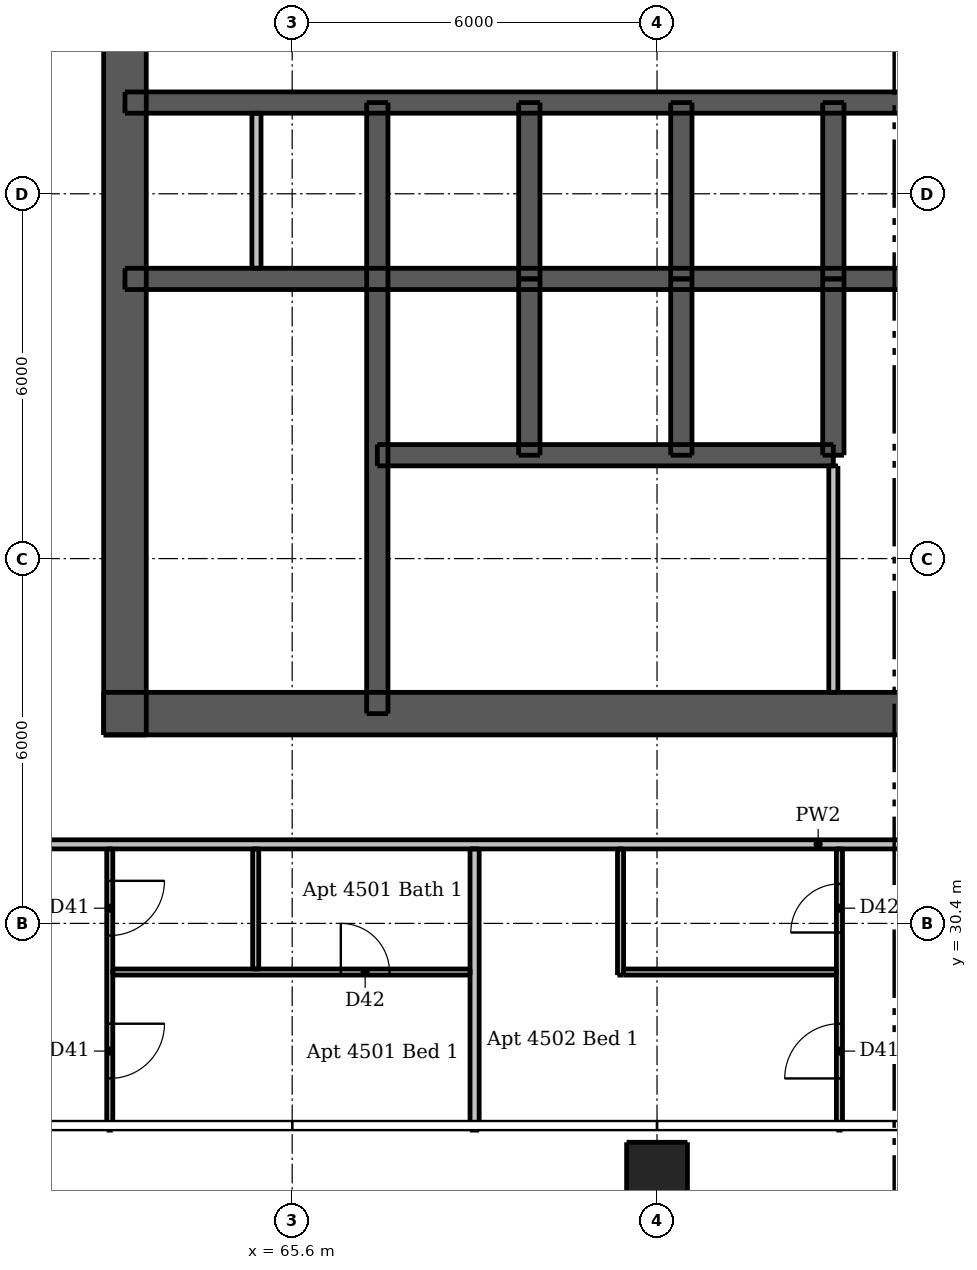
"""IFC4 building model, lengths in metres.
Left out: names, types, materials, properties, quantities, classifications, styles, units other than length and angle.
Written with IfcOpenShell. Run it as: python <this file> out.ifc"""

import sys

from ifc_helpers import new_model, si_unit, direction, frame, frame_2d, origin, origin_2d, place, context, subcontext, project, spatial, rectangle, extrude, element, fill, save


model = new_model("IFC4")
c1 = context("Model", 3, precision=1e-05, world=origin(), true_north=direction((0.0, 1.0)))
c2 = subcontext(c1, "Body", "Model", "MODEL_VIEW")
j1 = project(units=[si_unit("LENGTHUNIT", "METRE"), si_unit("PLANEANGLEUNIT", "RADIAN")], contexts=[c1])
p1 = place(None, origin())
s1 = spatial("IfcSite", under=j1, at=p1, CompositionType="ELEMENT")
p2 = place(p1, origin())
s2 = spatial("IfcBuilding", under=s1, at=p2, CompositionType="ELEMENT")
p3 = place(p2, frame((0.0, 0.0, 168.1)))
s3 = spatial("IfcBuildingStorey", under=s2, at=p3, CompositionType="ELEMENT", Elevation=168.1)
p4 = place(p3, frame((62.5, 33.85, 0.0), z_axis=(0.0, 0.0, 1.0), x_axis=(1.0, 0.0, 0.0)))
e1 = element("IfcWall", 1, at=p4, inside=s3, PredefinedType="SHEAR", context=c2, shape_type="SweptSolid", body=[
    extrude(rectangle(XDim=24.0, YDim=0.7, at=frame_2d((12.0, 0.0))), origin(), (0.0, 0.0, 1.0), 3.05),
])
p5 = place(p4, frame((1.962, 0.0, 0.0)))
e2 = element("IfcOpeningElement", 2, at=p5, cuts=e1, PredefinedType="OPENING", context=c2, shape_type="SweptSolid", body=[
    extrude(rectangle(XDim=1.1, YDim=2.1, at=frame_2d((0.55, 1.05))), frame((0.0, 0.36, 0.0), z_axis=(0.0, -1.0, 0.0), x_axis=(1.0, 0.0, 0.0)), (0.0, 0.0, 1.0), 0.72),
])
p6 = place(p4, frame((20.938, 0.0, 0.0)))
e3 = element("IfcOpeningElement", 3, at=p6, cuts=e1, PredefinedType="OPENING", context=c2, shape_type="SweptSolid", body=[
    extrude(rectangle(XDim=1.1, YDim=2.1, at=frame_2d((0.55, 1.05))), frame((0.0, 0.36, 0.0), z_axis=(0.0, -1.0, 0.0), x_axis=(1.0, 0.0, 0.0)), (0.0, 0.0, 1.0), 0.72),
])
p7 = place(p4, frame((8.0, 0.0, 0.0)))
e4 = element("IfcOpeningElement", 4, at=p7, cuts=e1, PredefinedType="OPENING", context=c2, shape_type="SweptSolid", body=[
    extrude(rectangle(XDim=1.1, YDim=2.1, at=frame_2d((0.55, 1.05))), frame((0.0, 0.36, 0.0), z_axis=(0.0, -1.0, 0.0), x_axis=(1.0, 0.0, 0.0)), (0.0, 0.0, 1.0), 0.72),
])
p8 = place(p4, frame((15.3, 0.0, 0.0)))
e5 = element("IfcOpeningElement", 5, at=p8, cuts=e1, PredefinedType="OPENING", context=c2, shape_type="SweptSolid", body=[
    extrude(rectangle(XDim=0.9, YDim=2.1, at=frame_2d((0.45, 1.05))), frame((0.0, 0.36, 0.0), z_axis=(0.0, -1.0, 0.0), x_axis=(1.0, 0.0, 0.0)), (0.0, 0.0, 1.0), 0.72),
])
p9 = place(p3, frame((62.85, 33.5, 0.0), z_axis=(0.0, 0.0, 1.0), x_axis=(0.0, 1.0, 0.0)))
e6 = element("IfcWall", 6, at=p9, inside=s3, PredefinedType="SHEAR", context=c2, shape_type="SweptSolid", body=[
    extrude(rectangle(XDim=24.0, YDim=0.7, at=frame_2d((12.0, 0.0))), origin(), (0.0, 0.0, 1.0), 3.05),
])
p10 = place(p9, frame((11.2, 0.0, 0.0)))
e7 = element("IfcOpeningElement", 7, at=p10, cuts=e6, PredefinedType="OPENING", context=c2, shape_type="SweptSolid", body=[
    extrude(rectangle(XDim=1.6, YDim=2.1, at=frame_2d((0.8, 1.05))), frame((0.0, 0.36, 0.0), z_axis=(0.0, -1.0, 0.0), x_axis=(1.0, 0.0, 0.0)), (0.0, 0.0, 1.0), 0.72),
])
p11 = place(p3, frame((62.85, 41.0, 0.0), z_axis=(0.0, 0.0, 1.0), x_axis=(1.0, 0.0, 0.0)))
e8 = element("IfcWall", 8, at=p11, inside=s3, PredefinedType="SHEAR", context=c2, shape_type="SweptSolid", body=[
    extrude(rectangle(XDim=23.3, YDim=0.35, at=frame_2d((11.65, 0.0))), origin(), (0.0, 0.0, 1.0), 3.05),
])
p12 = place(p3, frame((62.85, 43.9, 0.0), z_axis=(0.0, 0.0, 1.0), x_axis=(1.0, 0.0, 0.0)))
e9 = element("IfcWall", 9, at=p12, inside=s3, PredefinedType="SHEAR", context=c2, shape_type="SweptSolid", body=[
    extrude(rectangle(XDim=23.3, YDim=0.35, at=frame_2d((11.65, 0.0))), origin(), (0.0, 0.0, 1.0), 3.05),
])
p13 = place(p12, frame((0.806, 0.0, 0.0)))
e10 = element("IfcOpeningElement", 10, at=p13, cuts=e9, PredefinedType="OPENING", context=c2, shape_type="SweptSolid", body=[
    extrude(rectangle(XDim=0.9, YDim=2.1, at=frame_2d((0.45, 1.05))), frame((0.0, 0.185, 0.0), z_axis=(0.0, -1.0, 0.0), x_axis=(1.0, 0.0, 0.0)), (0.0, 0.0, 1.0), 0.37),
])
p14 = place(p12, frame((2.619, 0.0, 0.0)))
e11 = element("IfcOpeningElement", 11, at=p14, cuts=e9, PredefinedType="OPENING", context=c2, shape_type="SweptSolid", body=[
    extrude(rectangle(XDim=0.9, YDim=2.1, at=frame_2d((0.45, 1.05))), frame((0.0, 0.185, 0.0), z_axis=(0.0, -1.0, 0.0), x_axis=(1.0, 0.0, 0.0)), (0.0, 0.0, 1.0), 0.37),
])
p15 = place(p12, frame((20.688, 0.0, 0.0)))
e12 = element("IfcOpeningElement", 12, at=p15, cuts=e9, PredefinedType="OPENING", context=c2, shape_type="SweptSolid", body=[
    extrude(rectangle(XDim=0.9, YDim=2.1, at=frame_2d((0.45, 1.05))), frame((0.0, 0.185, 0.0), z_axis=(0.0, -1.0, 0.0), x_axis=(1.0, 0.0, 0.0)), (0.0, 0.0, 1.0), 0.37),
])
p16 = place(p12, frame((7.45, 0.0, 0.0)))
e13 = element("IfcOpeningElement", 13, at=p16, cuts=e9, PredefinedType="OPENING", context=c2, shape_type="SweptSolid", body=[
    extrude(rectangle(XDim=0.9, YDim=2.1, at=frame_2d((0.45, 1.05))), frame((0.0, 0.185, 0.0), z_axis=(0.0, -1.0, 0.0), x_axis=(1.0, 0.0, 0.0)), (0.0, 0.0, 1.0), 0.37),
])
p17 = place(p12, frame((9.95, 0.0, 0.0)))
e14 = element("IfcOpeningElement", 14, at=p17, cuts=e9, PredefinedType="OPENING", context=c2, shape_type="SweptSolid", body=[
    extrude(rectangle(XDim=0.9, YDim=2.1, at=frame_2d((0.45, 1.05))), frame((0.0, 0.185, 0.0), z_axis=(0.0, -1.0, 0.0), x_axis=(1.0, 0.0, 0.0)), (0.0, 0.0, 1.0), 0.37),
])
p18 = place(p12, frame((14.95, 0.0, 0.0)))
e15 = element("IfcOpeningElement", 15, at=p18, cuts=e9, PredefinedType="OPENING", context=c2, shape_type="SweptSolid", body=[
    extrude(rectangle(XDim=0.9, YDim=2.1, at=frame_2d((0.45, 1.05))), frame((0.0, 0.185, 0.0), z_axis=(0.0, -1.0, 0.0), x_axis=(1.0, 0.0, 0.0)), (0.0, 0.0, 1.0), 0.37),
])
p19 = place(p12, frame((17.45, 0.0, 0.0)))
e16 = element("IfcOpeningElement", 16, at=p19, cuts=e9, PredefinedType="OPENING", context=c2, shape_type="SweptSolid", body=[
    extrude(rectangle(XDim=0.9, YDim=2.1, at=frame_2d((0.45, 1.05))), frame((0.0, 0.185, 0.0), z_axis=(0.0, -1.0, 0.0), x_axis=(1.0, 0.0, 0.0)), (0.0, 0.0, 1.0), 0.37),
])
p20 = place(p3, frame((67.0, 33.85, 0.0), z_axis=(0.0, 0.0, 1.0), x_axis=(0.0, 1.0, 0.0)))
e17 = element("IfcWall", 17, at=p20, inside=s3, PredefinedType="SHEAR", context=c2, shape_type="SweptSolid", body=[
    extrude(rectangle(XDim=10.05, YDim=0.35, at=frame_2d((5.025, 0.0))), origin(), (0.0, 0.0, 1.0), 3.05),
])
p21 = place(p20, frame((0.55, 0.0, 0.0)))
e18 = element("IfcOpeningElement", 18, at=p21, cuts=e17, PredefinedType="OPENING", context=c2, shape_type="SweptSolid", body=[
    extrude(rectangle(XDim=1.1, YDim=2.1, at=frame_2d((0.55, 1.05))), frame((0.0, 0.185, 0.0), z_axis=(0.0, -1.0, 0.0), x_axis=(1.0, 0.0, 0.0)), (0.0, 0.0, 1.0), 0.37),
])
for number, where, z_axis, x_axis in (
    (19, (69.5, 41.0, 0.0), (0.0, 0.0, 1.0), (0.0, 1.0, 0.0)),
    (20, (72.0, 41.0, 0.0), (0.0, 0.0, 1.0), (0.0, 1.0, 0.0)),
    (21, (74.5, 41.0, 0.0), (0.0, 0.0, 1.0), (0.0, 1.0, 0.0)),
):
    element("IfcWall", number, at=place(p3, frame(where, z_axis=z_axis, x_axis=x_axis)), inside=s3, PredefinedType="SHEAR", context=c2, shape_type="SweptSolid", body=[
        extrude(rectangle(XDim=2.9, YDim=0.35, at=frame_2d((1.45, 0.0))), origin(), (0.0, 0.0, 1.0), 3.05),
    ])
p22 = place(p3, frame((67.0, 38.1, 0.0), z_axis=(0.0, 0.0, 1.0), x_axis=(1.0, 0.0, 0.0)))
e22 = element("IfcWall", 22, at=p22, inside=s3, PredefinedType="SHEAR", context=c2, shape_type="SweptSolid", body=[
    extrude(rectangle(XDim=7.5, YDim=0.35, at=frame_2d((3.75, 0.0))), origin(), (0.0, 0.0, 1.0), 3.05),
])
p23 = place(p22, frame((0.7, 0.0, 0.0)))
e23 = element("IfcOpeningElement", 23, at=p23, cuts=e22, PredefinedType="OPENING", context=c2, shape_type="SweptSolid", body=[
    extrude(rectangle(XDim=1.1, YDim=2.1, at=frame_2d((0.55, 1.05))), frame((0.0, 0.185, 0.0), z_axis=(0.0, -1.0, 0.0), x_axis=(1.0, 0.0, 0.0)), (0.0, 0.0, 1.0), 0.37),
])
p24 = place(p22, frame((3.2, 0.0, 0.0)))
e24 = element("IfcOpeningElement", 24, at=p24, cuts=e22, PredefinedType="OPENING", context=c2, shape_type="SweptSolid", body=[
    extrude(rectangle(XDim=1.1, YDim=2.1, at=frame_2d((0.55, 1.05))), frame((0.0, 0.185, 0.0), z_axis=(0.0, -1.0, 0.0), x_axis=(1.0, 0.0, 0.0)), (0.0, 0.0, 1.0), 0.37),
])
p25 = place(p22, frame((5.65, 0.0, 0.0)))
e25 = element("IfcOpeningElement", 25, at=p25, cuts=e22, PredefinedType="OPENING", context=c2, shape_type="SweptSolid", body=[
    extrude(rectangle(XDim=1.2, YDim=2.1, at=frame_2d((0.6, 1.05))), frame((0.0, 0.185, 0.0), z_axis=(0.0, -1.0, 0.0), x_axis=(1.0, 0.0, 0.0)), (0.0, 0.0, 1.0), 0.37),
])
for number, where, z_axis, x_axis in (
    (26, (69.5, 38.1, 0.0), (0.0, 0.0, 1.0), (0.0, 1.0, 0.0)),
    (27, (72.0, 38.1, 0.0), (0.0, 0.0, 1.0), (0.0, 1.0, 0.0)),
    (28, (74.5, 38.1, 0.0), (0.0, 0.0, 1.0), (0.0, 1.0, 0.0)),
):
    element("IfcWall", number, at=place(p3, frame(where, z_axis=z_axis, x_axis=x_axis)), inside=s3, PredefinedType="SHEAR", context=c2, shape_type="SweptSolid", body=[
        extrude(rectangle(XDim=2.9, YDim=0.35, at=frame_2d((1.45, 0.0))), origin(), (0.0, 0.0, 1.0), 3.05),
    ])
p26 = place(p3, frame((71.6, 26.3, 0.0), z_axis=(0.0, 0.0, 1.0), x_axis=(1.0, 0.0, 0.0)))
e29 = element("IfcColumn", 29, at=p26, inside=s3, PredefinedType="COLUMN", context=c2, shape_type="SweptSolid", body=[
    extrude(rectangle(XDim=1.0, YDim=1.0, at=origin_2d()), origin(), (0.0, 0.0, 1.0), 3.05),
])
p27 = place(p3, frame((74.5, 34.2, 0.0), z_axis=(0.0, 0.0, 1.0), x_axis=(0.0, 1.0, 0.0)))
e30 = element("IfcWall", 30, at=p27, inside=s3, PredefinedType="PLUMBINGWALL", context=c2, shape_type="SweptSolid", body=[
    extrude(rectangle(XDim=3.725, YDim=0.15, at=frame_2d((1.863, 0.0))), origin(), (0.0, 0.0, 1.0), 3.05),
])
p28 = place(p3, frame((65.012, 41.175, 0.0), z_axis=(0.0, 0.0, 1.0), x_axis=(0.0, 1.0, 0.0)))
e31 = element("IfcWall", 31, at=p28, inside=s3, PredefinedType="PLUMBINGWALL", context=c2, shape_type="SweptSolid", body=[
    extrude(rectangle(XDim=2.55, YDim=0.15, at=frame_2d((1.275, 0.0))), origin(), (0.0, 0.0, 1.0), 3.05),
])
p29 = place(p3, frame((62.6, 31.625, 0.0), z_axis=(0.0, 0.0, 1.0), x_axis=(0.0, -1.0, 0.0)))
e32 = element("IfcWall", 32, at=p29, inside=s3, PredefinedType="PARTITIONING", context=c2, shape_type="SweptSolid", body=[
    extrude(rectangle(XDim=4.625, YDim=0.1, at=frame_2d((2.312, 0.0))), origin(), (0.0, 0.0, 1.0), 3.05),
])
p30 = place(p29, frame((0.525, 0.0, 0.0)))
e33 = element("IfcOpeningElement", 33, at=p30, cuts=e32, PredefinedType="OPENING", context=c2, shape_type="SweptSolid", body=[
    extrude(rectangle(XDim=0.9, YDim=2.1, at=frame_2d((0.45, 1.05))), frame((0.0, 0.06, 0.0), z_axis=(0.0, -1.0, 0.0), x_axis=(1.0, 0.0, 0.0)), (0.0, 0.0, 1.0), 0.12),
])
p31 = place(p29, frame((2.875, 0.0, 0.0)))
e34 = element("IfcOpeningElement", 34, at=p31, cuts=e32, PredefinedType="OPENING", context=c2, shape_type="SweptSolid", body=[
    extrude(rectangle(XDim=0.9, YDim=2.1, at=frame_2d((0.45, 1.05))), frame((0.0, 0.06, 0.0), z_axis=(0.0, -1.0, 0.0), x_axis=(1.0, 0.0, 0.0)), (0.0, 0.0, 1.0), 0.12),
])
p32 = place(p3, frame((65.0, 29.65, 0.0), z_axis=(0.0, 0.0, 1.0), x_axis=(0.0, 1.0, 0.0)))
e35 = element("IfcWall", 35, at=p32, inside=s3, PredefinedType="PARTITIONING", context=c2, shape_type="SweptSolid", body=[
    extrude(rectangle(XDim=1.975, YDim=0.1, at=frame_2d((0.988, 0.0))), origin(), (0.0, 0.0, 1.0), 3.05),
])
p33 = place(p3, frame((71.0, 29.55, 0.0), z_axis=(0.0, 0.0, 1.0), x_axis=(0.0, 1.0, 0.0)))
e36 = element("IfcWall", 36, at=p33, inside=s3, PredefinedType="PARTITIONING", context=c2, shape_type="SweptSolid", body=[
    extrude(rectangle(XDim=2.075, YDim=0.1, at=frame_2d((1.038, 0.0))), origin(), (0.0, 0.0, 1.0), 3.05),
])
p34 = place(p3, frame((74.6, 27.0, 0.0), z_axis=(0.0, 0.0, 1.0), x_axis=(0.0, 1.0, 0.0)))
e37 = element("IfcWall", 37, at=p34, inside=s3, PredefinedType="PARTITIONING", context=c2, shape_type="SweptSolid", body=[
    extrude(rectangle(XDim=4.625, YDim=0.1, at=frame_2d((2.312, 0.0))), origin(), (0.0, 0.0, 1.0), 3.05),
])
p35 = place(p34, frame((0.85, 0.0, 0.0)))
e38 = element("IfcOpeningElement", 38, at=p35, cuts=e37, PredefinedType="OPENING", context=c2, shape_type="SweptSolid", body=[
    extrude(rectangle(XDim=0.9, YDim=2.1, at=frame_2d((0.45, 1.05))), frame((0.0, 0.06, 0.0), z_axis=(0.0, -1.0, 0.0), x_axis=(1.0, 0.0, 0.0)), (0.0, 0.0, 1.0), 0.12),
])
p36 = place(p34, frame((3.25, 0.0, 0.0)))
e39 = element("IfcOpeningElement", 39, at=p36, cuts=e37, PredefinedType="OPENING", context=c2, shape_type="SweptSolid", body=[
    extrude(rectangle(XDim=0.8, YDim=2.1, at=frame_2d((0.4, 1.05))), frame((0.0, 0.06, 0.0), z_axis=(0.0, -1.0, 0.0), x_axis=(1.0, 0.0, 0.0)), (0.0, 0.0, 1.0), 0.12),
])
p37 = place(p3, frame((62.65, 29.6, 0.0), z_axis=(0.0, 0.0, 1.0), x_axis=(1.0, 0.0, 0.0)))
e40 = element("IfcWall", 40, at=p37, inside=s3, PredefinedType="PARTITIONING", context=c2, shape_type="SweptSolid", body=[
    extrude(rectangle(XDim=5.875, YDim=0.1, at=frame_2d((2.938, 0.0))), origin(), (0.0, 0.0, 1.0), 3.05),
])
p38 = place(p37, frame((3.75, 0.0, 0.0)))
e41 = element("IfcOpeningElement", 41, at=p38, cuts=e40, PredefinedType="OPENING", context=c2, shape_type="SweptSolid", body=[
    extrude(rectangle(XDim=0.8, YDim=2.1, at=frame_2d((0.4, 1.05))), frame((0.0, 0.06, 0.0), z_axis=(0.0, -1.0, 0.0), x_axis=(1.0, 0.0, 0.0)), (0.0, 0.0, 1.0), 0.12),
])
p39 = place(p3, frame((71.05, 29.6, 0.0), z_axis=(0.0, 0.0, 1.0), x_axis=(1.0, 0.0, 0.0)))
e42 = element("IfcWall", 42, at=p39, inside=s3, PredefinedType="PARTITIONING", context=c2, shape_type="SweptSolid", body=[
    extrude(rectangle(XDim=3.5, YDim=0.1, at=frame_2d((1.75, 0.0))), origin(), (0.0, 0.0, 1.0), 3.05),
])
p40 = place(p3, frame((68.6, 27.0, 0.0), z_axis=(0.0, 0.0, 1.0), x_axis=(0.0, 1.0, 0.0)))
e43 = element("IfcWall", 43, at=p40, inside=s3, PredefinedType="PARTITIONING", context=c2, shape_type="SweptSolid", body=[
    extrude(rectangle(XDim=4.625, YDim=0.15, at=frame_2d((2.312, 0.0))), origin(), (0.0, 0.0, 1.0), 3.05),
])
p41 = place(p3, frame((89.525, 31.7, 0.0), z_axis=(0.0, 0.0, 1.0), x_axis=(-1.0, 0.0, 0.0)))
e44 = element("IfcWall", 44, at=p41, inside=s3, PredefinedType="PARTITIONING", context=c2, shape_type="SweptSolid", body=[
    extrude(rectangle(XDim=30.55, YDim=0.15, at=frame_2d((15.275, 0.0))), origin(), (0.0, 0.0, 1.0), 3.05),
])
p42 = place(p41, frame((28.275, 0.0, 0.0)))
e45 = element("IfcOpeningElement", 45, at=p42, cuts=e44, PredefinedType="OPENING", context=c2, shape_type="SweptSolid", body=[
    extrude(rectangle(XDim=1.0, YDim=2.1, at=frame_2d((0.5, 1.05))), frame((0.0, 0.085, 0.0), z_axis=(0.0, -1.0, 0.0), x_axis=(1.0, 0.0, 0.0)), (0.0, 0.0, 1.0), 0.17),
])
p43 = place(p41, frame((9.925, 0.0, 0.0)))
e46 = element("IfcOpeningElement", 46, at=p43, cuts=e44, PredefinedType="OPENING", context=c2, shape_type="SweptSolid", body=[
    extrude(rectangle(XDim=1.0, YDim=2.1, at=frame_2d((0.5, 1.05))), frame((0.0, 0.085, 0.0), z_axis=(0.0, -1.0, 0.0), x_axis=(1.0, 0.0, 0.0)), (0.0, 0.0, 1.0), 0.17),
])
p44 = place(p5, origin())
e47 = element("IfcDoor", 47, at=p44, inside=s3, OperationType="SINGLE_SWING_LEFT", PredefinedType="DOOR", context=c2, shape_type="SweptSolid", body=[
    extrude(rectangle(XDim=1.1, YDim=2.1, at=frame_2d((0.55, 1.05))), frame((0.0, 0.337, 0.0), z_axis=(0.0, -1.0, 0.0), x_axis=(1.0, 0.0, 0.0)), (0.0, 0.0, 1.0), 0.05),
])
fill(e2, e47)
p45 = place(p10, origin())
e48 = element("IfcDoor", 48, at=p45, inside=s3, OperationType="DOUBLE_DOOR_SINGLE_SWING", PredefinedType="DOOR", context=c2, shape_type="SweptSolid", body=[
    extrude(rectangle(XDim=1.6, YDim=2.1, at=frame_2d((0.8, 1.05))), frame((0.0, -0.288, 0.0), z_axis=(0.0, -1.0, 0.0), x_axis=(1.0, 0.0, 0.0)), (0.0, 0.0, 1.0), 0.05),
])
fill(e7, e48)
p46 = place(p7, origin())
e49 = element("IfcDoor", 49, at=p46, inside=s3, OperationType="SINGLE_SWING_LEFT", PredefinedType="DOOR", context=c2, shape_type="SweptSolid", body=[
    extrude(rectangle(XDim=1.1, YDim=2.1, at=frame_2d((0.55, 1.05))), frame((0.0, 0.337, 0.0), z_axis=(0.0, -1.0, 0.0), x_axis=(1.0, 0.0, 0.0)), (0.0, 0.0, 1.0), 0.05),
])
fill(e4, e49)
p47 = place(p21, origin())
e50 = element("IfcDoor", 50, at=p47, inside=s3, OperationType="SINGLE_SWING_RIGHT", PredefinedType="DOOR", context=c2, shape_type="SweptSolid", body=[
    extrude(rectangle(XDim=1.1, YDim=2.1, at=frame_2d((0.55, 1.05))), frame((0.0, -0.112, 0.0), z_axis=(0.0, -1.0, 0.0), x_axis=(1.0, 0.0, 0.0)), (0.0, 0.0, 1.0), 0.05),
])
fill(e18, e50)
p48 = place(p13, origin())
e51 = element("IfcDoor", 51, at=p48, inside=s3, OperationType="SINGLE_SWING_LEFT", PredefinedType="DOOR", context=c2, shape_type="SweptSolid", body=[
    extrude(rectangle(XDim=0.9, YDim=2.1, at=frame_2d((0.45, 1.05))), frame((0.0, -0.112, 0.0), z_axis=(0.0, -1.0, 0.0), x_axis=(1.0, 0.0, 0.0)), (0.0, 0.0, 1.0), 0.05),
])
fill(e10, e51)
p49 = place(p14, origin())
e52 = element("IfcDoor", 52, at=p49, inside=s3, OperationType="SINGLE_SWING_RIGHT", PredefinedType="DOOR", context=c2, shape_type="SweptSolid", body=[
    extrude(rectangle(XDim=0.9, YDim=2.1, at=frame_2d((0.45, 1.05))), frame((0.0, -0.112, 0.0), z_axis=(0.0, -1.0, 0.0), x_axis=(1.0, 0.0, 0.0)), (0.0, 0.0, 1.0), 0.05),
])
fill(e11, e52)
p50 = place(p16, origin())
e53 = element("IfcDoor", 53, at=p50, inside=s3, OperationType="SINGLE_SWING_LEFT", PredefinedType="DOOR", context=c2, shape_type="SweptSolid", body=[
    extrude(rectangle(XDim=0.9, YDim=2.1, at=frame_2d((0.45, 1.05))), frame((0.0, -0.112, 0.0), z_axis=(0.0, -1.0, 0.0), x_axis=(1.0, 0.0, 0.0)), (0.0, 0.0, 1.0), 0.05),
])
fill(e13, e53)
p51 = place(p17, origin())
e54 = element("IfcDoor", 54, at=p51, inside=s3, OperationType="SINGLE_SWING_RIGHT", PredefinedType="DOOR", context=c2, shape_type="SweptSolid", body=[
    extrude(rectangle(XDim=0.9, YDim=2.1, at=frame_2d((0.45, 1.05))), frame((0.0, -0.112, 0.0), z_axis=(0.0, -1.0, 0.0), x_axis=(1.0, 0.0, 0.0)), (0.0, 0.0, 1.0), 0.05),
])
fill(e14, e54)
p52 = place(p23, origin())
e55 = element("IfcDoor", 55, at=p52, inside=s3, OperationType="DOUBLE_DOOR_SLIDING", PredefinedType="DOOR", context=c2, shape_type="SweptSolid", body=[
    extrude(rectangle(XDim=1.1, YDim=2.1, at=frame_2d((0.55, 1.05))), frame((0.0, 0.025, 0.0), z_axis=(0.0, -1.0, 0.0), x_axis=(1.0, 0.0, 0.0)), (0.0, 0.0, 1.0), 0.05),
])
fill(e23, e55)
p53 = place(p24, origin())
e56 = element("IfcDoor", 56, at=p53, inside=s3, OperationType="DOUBLE_DOOR_SLIDING", PredefinedType="DOOR", context=c2, shape_type="SweptSolid", body=[
    extrude(rectangle(XDim=1.1, YDim=2.1, at=frame_2d((0.55, 1.05))), frame((0.0, 0.025, 0.0), z_axis=(0.0, -1.0, 0.0), x_axis=(1.0, 0.0, 0.0)), (0.0, 0.0, 1.0), 0.05),
])
fill(e24, e56)
p54 = place(p25, origin())
e57 = element("IfcDoor", 57, at=p54, inside=s3, OperationType="DOUBLE_DOOR_SLIDING", PredefinedType="DOOR", context=c2, shape_type="SweptSolid", body=[
    extrude(rectangle(XDim=1.2, YDim=2.1, at=frame_2d((0.6, 1.05))), frame((0.0, 0.025, 0.0), z_axis=(0.0, -1.0, 0.0), x_axis=(1.0, 0.0, 0.0)), (0.0, 0.0, 1.0), 0.05),
])
fill(e25, e57)
p55 = place(p30, origin())
e58 = element("IfcDoor", 58, at=p55, inside=s3, OperationType="SINGLE_SWING_LEFT", PredefinedType="DOOR", context=c2, shape_type="SweptSolid", body=[
    extrude(rectangle(XDim=0.9, YDim=2.1, at=frame_2d((0.45, 1.05))), frame((0.0, 0.025, 0.0), z_axis=(0.0, -1.0, 0.0), x_axis=(1.0, 0.0, 0.0)), (0.0, 0.0, 1.0), 0.05),
])
fill(e33, e58)
p56 = place(p31, origin())
e59 = element("IfcDoor", 59, at=p56, inside=s3, OperationType="SINGLE_SWING_LEFT", PredefinedType="DOOR", context=c2, shape_type="SweptSolid", body=[
    extrude(rectangle(XDim=0.9, YDim=2.1, at=frame_2d((0.45, 1.05))), frame((0.0, 0.025, 0.0), z_axis=(0.0, -1.0, 0.0), x_axis=(1.0, 0.0, 0.0)), (0.0, 0.0, 1.0), 0.05),
])
fill(e34, e59)
p57 = place(p38, origin())
e60 = element("IfcDoor", 60, at=p57, inside=s3, OperationType="SINGLE_SWING_LEFT", PredefinedType="DOOR", context=c2, shape_type="SweptSolid", body=[
    extrude(rectangle(XDim=0.8, YDim=2.1, at=frame_2d((0.4, 1.05))), frame((0.0, 0.025, 0.0), z_axis=(0.0, -1.0, 0.0), x_axis=(1.0, 0.0, 0.0)), (0.0, 0.0, 1.0), 0.05),
])
fill(e41, e60)
p58 = place(p35, origin())
e61 = element("IfcDoor", 61, at=p58, inside=s3, OperationType="SINGLE_SWING_LEFT", PredefinedType="DOOR", context=c2, shape_type="SweptSolid", body=[
    extrude(rectangle(XDim=0.9, YDim=2.1, at=frame_2d((0.45, 1.05))), frame((0.0, 0.025, 0.0), z_axis=(0.0, -1.0, 0.0), x_axis=(1.0, 0.0, 0.0)), (0.0, 0.0, 1.0), 0.05),
])
fill(e38, e61)
p59 = place(p36, origin())
e62 = element("IfcDoor", 62, at=p59, inside=s3, OperationType="SINGLE_SWING_LEFT", PredefinedType="DOOR", context=c2, shape_type="SweptSolid", body=[
    extrude(rectangle(XDim=0.8, YDim=2.1, at=frame_2d((0.4, 1.05))), frame((0.0, 0.025, 0.0), z_axis=(0.0, -1.0, 0.0), x_axis=(1.0, 0.0, 0.0)), (0.0, 0.0, 1.0), 0.05),
])
fill(e39, e62)
save(model, sys.argv[1])
